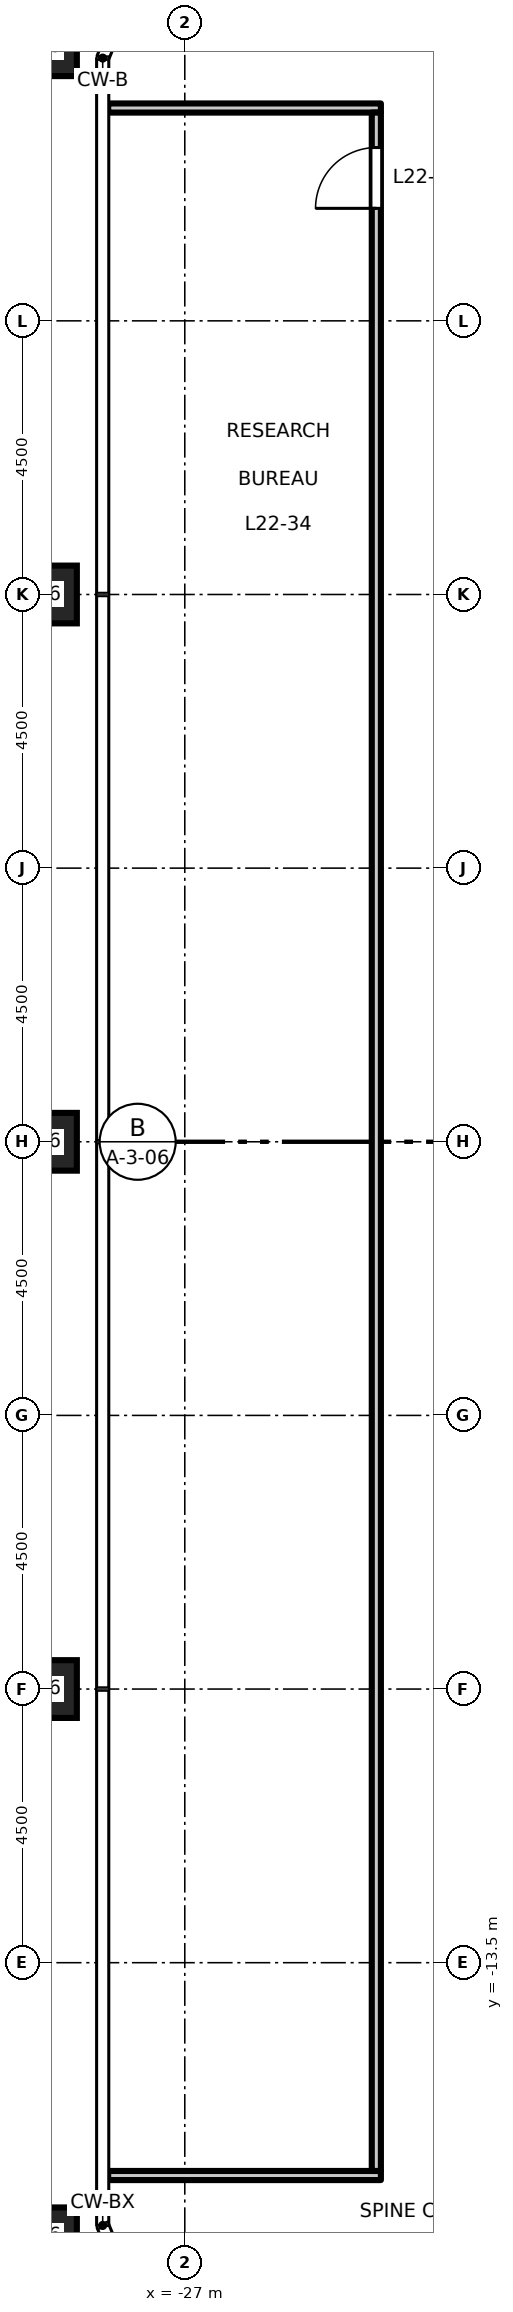
"""IFC4 building model, lengths in metres.
Left out: names, types, materials, properties, quantities, classifications, styles, units other than length and angle.
Written with IfcOpenShell. Run it as: python <this file> out.ifc"""

import sys

from ifc_helpers import new_model, si_unit, direction, frame, frame_2d, origin, origin_2d, place, context, subcontext, project, spatial, rectangle, hollow_rectangle, extrude, element, fill, save


model = new_model("IFC4")
c1 = context("Model", 3, precision=1e-05, world=origin(), true_north=direction((0.0, 1.0)))
c2 = subcontext(c1, "Body", "Model", "MODEL_VIEW")
j1 = project(units=[si_unit("LENGTHUNIT", "METRE"), si_unit("PLANEANGLEUNIT", "RADIAN")], contexts=[c1])
p1 = place(None, origin())
s1 = spatial("IfcSite", under=j1, at=p1, CompositionType="ELEMENT")
p2 = place(p1, origin())
s2 = spatial("IfcBuilding", under=s1, at=p2, CompositionType="ELEMENT")
p3 = place(p2, frame((0.0, 0.0, 104.7)))
s3 = spatial("IfcBuildingStorey", under=s2, at=p3, CompositionType="ELEMENT", Elevation=104.7)
for number, where, z_axis, x_axis in (
    (1, (-29.25, 18.0, 0.0), (0.0, 0.0, 1.0), (1.0, 0.0, 0.0)),
    (2, (-29.25, 9.0, 0.0), (0.0, 0.0, 1.0), (1.0, 0.0, 0.0)),
    (3, (-29.25, 0.0, 0.0), (0.0, 0.0, 1.0), (1.0, 0.0, 0.0)),
    (4, (-29.25, -9.0, 0.0), (0.0, 0.0, 1.0), (1.0, 0.0, 0.0)),
    (5, (-29.25, -18.0, 0.0), (0.0, 0.0, 1.0), (1.0, 0.0, 0.0)),
):
    element("IfcColumn", number, at=place(p3, frame(where, z_axis=z_axis, x_axis=x_axis)), inside=s3, PredefinedType="COLUMN", context=c2, shape_type="SweptSolid", body=[
        extrude(hollow_rectangle(XDim=0.95, YDim=0.95, WallThickness=0.055, at=origin_2d()), origin(), (0.0, 0.0, 1.0), 4.5),
    ])
for number, where, z_axis, x_axis in (
    (6, (-28.26, -17.0, 0.0), (0.0, 0.0, 1.0), (1.0, 0.0, 0.0)),
    (7, (-28.26, 17.0, 0.0), (0.0, 0.0, 1.0), (1.0, 0.0, 0.0)),
):
    element("IfcWall", number, at=place(p3, frame(where, z_axis=z_axis, x_axis=x_axis)), inside=s3, PredefinedType="PARTITIONING", context=c2, shape_type="SweptSolid", body=[
        extrude(rectangle(XDim=4.485, YDim=0.15, at=frame_2d((2.243, 0.0))), origin(), (0.0, 0.0, 1.0), 4.35),
    ])
p4 = place(p3, frame((-23.85, -16.925, 0.0), z_axis=(0.0, 0.0, 1.0), x_axis=(0.0, 1.0, 0.0)))
e8 = element("IfcWall", 8, at=p4, inside=s3, PredefinedType="PARTITIONING", context=c2, shape_type="SweptSolid", body=[
    extrude(rectangle(XDim=33.85, YDim=0.15, at=frame_2d((16.925, 0.0))), origin(), (0.0, 0.0, 1.0), 4.35),
])
p5 = place(p4, frame((32.275, 0.0, 0.0)))
e9 = element("IfcOpeningElement", 9, at=p5, cuts=e8, PredefinedType="OPENING", context=c2, shape_type="SweptSolid", body=[
    extrude(rectangle(XDim=1.0, YDim=2.1, at=frame_2d((0.5, 1.05))), frame((0.0, 0.085, 0.0), z_axis=(0.0, -1.0, 0.0), x_axis=(1.0, 0.0, 0.0)), (0.0, 0.0, 1.0), 0.17),
])
p6 = place(p5, origin())
e10 = element("IfcDoor", 10, at=p6, inside=s3, OperationType="SINGLE_SWING_LEFT", PredefinedType="DOOR", context=c2, shape_type="SweptSolid", body=[
    extrude(rectangle(XDim=1.0, YDim=2.1, at=frame_2d((0.5, 1.05))), frame((0.0, 0.025, 0.0), z_axis=(0.0, -1.0, 0.0), x_axis=(1.0, 0.0, 0.0)), (0.0, 0.0, 1.0), 0.05),
])
fill(e9, e10)
save(model, sys.argv[1])
